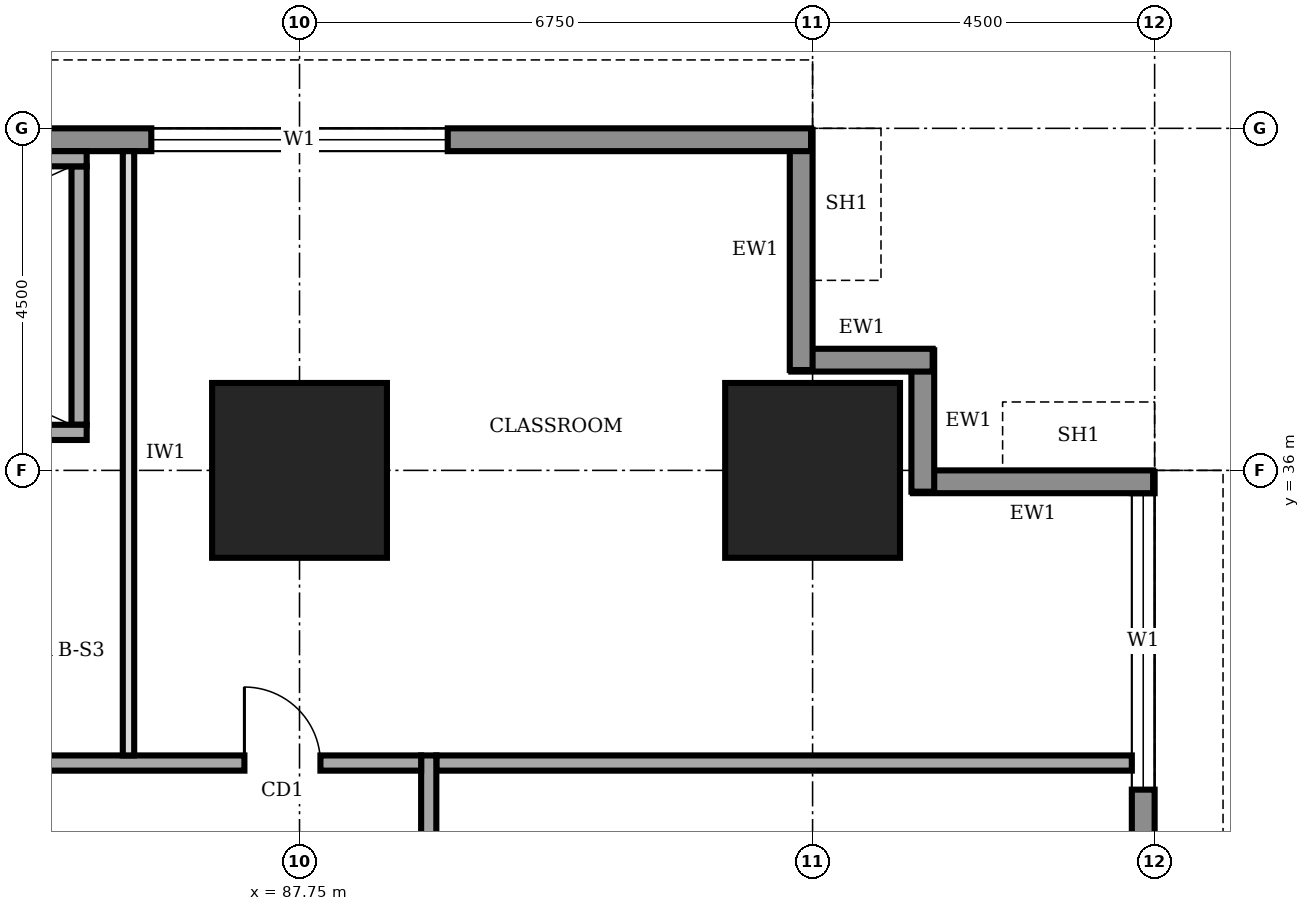
"""IFC4 building model, lengths in metres.
Left out: names, types, materials, properties, quantities, classifications, styles, units other than length and angle.
Written with IfcOpenShell. Run it as: python <this file> out.ifc"""

import sys

from ifc_helpers import new_model, si_unit, direction, frame, frame_2d, origin, origin_2d, place, context, subcontext, project, spatial, rectangle, extrude, element, fill, save


model = new_model("IFC4")
c1 = context("Model", 3, precision=1e-05, world=origin(), true_north=direction((0.0, 1.0)))
c2 = subcontext(c1, "Body", "Model", "MODEL_VIEW")
j1 = project(units=[si_unit("LENGTHUNIT", "METRE"), si_unit("PLANEANGLEUNIT", "RADIAN")], contexts=[c1])
p1 = place(None, origin())
s1 = spatial("IfcSite", under=j1, at=p1, CompositionType="ELEMENT")
p2 = place(p1, origin())
s2 = spatial("IfcBuilding", under=s1, at=p2, CompositionType="ELEMENT")
p3 = place(p2, frame((0.0, 0.0, 37.0)))
s3 = spatial("IfcBuildingStorey", under=s2, at=p3, CompositionType="ELEMENT", Elevation=37.0)
for number, where, z_axis, x_axis in (
    (1, (87.75, 36.0, 0.0), (0.0, 0.0, 1.0), (1.0, 0.0, 0.0)),
    (2, (94.5, 36.0, 0.0), (0.0, 0.0, 1.0), (1.0, 0.0, 0.0)),
):
    element("IfcColumn", number, at=place(p3, frame(where, z_axis=z_axis, x_axis=x_axis)), inside=s3, PredefinedType="COLUMN", context=c2, shape_type="SweptSolid", body=[
        extrude(rectangle(XDim=2.3, YDim=2.3, at=origin_2d()), origin(), (0.0, 0.0, 1.0), 4.0),
    ])
p4 = place(p3, frame((98.85, 4.52, 0.0), z_axis=(0.0, 0.0, 1.0), x_axis=(0.0, 1.0, 0.0)))
e3 = element("IfcWall", 3, at=p4, inside=s3, PredefinedType="STANDARD", context=c2, shape_type="SweptSolid", body=[
    extrude(rectangle(XDim=31.46, YDim=0.3, at=frame_2d((15.73, 0.0))), origin(), (0.0, 0.0, 1.0), 3.75),
])
p5 = place(p4, frame((4.78, 0.0, 0.9)))
e4 = element("IfcOpeningElement", 4, at=p5, cuts=e3, PredefinedType="OPENING", context=c2, shape_type="SweptSolid", body=[
    extrude(rectangle(XDim=3.9, YDim=2.2, at=frame_2d((1.95, 1.1))), frame((0.0, 0.16, 0.0), z_axis=(0.0, -1.0, 0.0), x_axis=(1.0, 0.0, 0.0)), (0.0, 0.0, 1.0), 0.32),
])
p6 = place(p4, frame((9.28, 0.0, 0.9)))
e5 = element("IfcOpeningElement", 5, at=p6, cuts=e3, PredefinedType="OPENING", context=c2, shape_type="SweptSolid", body=[
    extrude(rectangle(XDim=3.9, YDim=2.2, at=frame_2d((1.95, 1.1))), frame((0.0, 0.16, 0.0), z_axis=(0.0, -1.0, 0.0), x_axis=(1.0, 0.0, 0.0)), (0.0, 0.0, 1.0), 0.32),
])
p7 = place(p4, frame((13.78, 0.0, 0.9)))
e6 = element("IfcOpeningElement", 6, at=p7, cuts=e3, PredefinedType="OPENING", context=c2, shape_type="SweptSolid", body=[
    extrude(rectangle(XDim=3.9, YDim=2.2, at=frame_2d((1.95, 1.1))), frame((0.0, 0.16, 0.0), z_axis=(0.0, -1.0, 0.0), x_axis=(1.0, 0.0, 0.0)), (0.0, 0.0, 1.0), 0.32),
])
p8 = place(p4, frame((18.28, 0.0, 0.9)))
e7 = element("IfcOpeningElement", 7, at=p8, cuts=e3, PredefinedType="OPENING", context=c2, shape_type="SweptSolid", body=[
    extrude(rectangle(XDim=3.9, YDim=2.2, at=frame_2d((1.95, 1.1))), frame((0.0, 0.16, 0.0), z_axis=(0.0, -1.0, 0.0), x_axis=(1.0, 0.0, 0.0)), (0.0, 0.0, 1.0), 0.32),
])
p9 = place(p4, frame((22.78, 0.0, 0.9)))
e8 = element("IfcOpeningElement", 8, at=p9, cuts=e3, PredefinedType="OPENING", context=c2, shape_type="SweptSolid", body=[
    extrude(rectangle(XDim=3.9, YDim=2.2, at=frame_2d((1.95, 1.1))), frame((0.0, 0.16, 0.0), z_axis=(0.0, -1.0, 0.0), x_axis=(1.0, 0.0, 0.0)), (0.0, 0.0, 1.0), 0.32),
])
p10 = place(p4, frame((27.28, 0.0, 0.9)))
e9 = element("IfcOpeningElement", 9, at=p10, cuts=e3, PredefinedType="OPENING", context=c2, shape_type="SweptSolid", body=[
    extrude(rectangle(XDim=3.9, YDim=2.2, at=frame_2d((1.95, 1.1))), frame((0.0, 0.16, 0.0), z_axis=(0.0, -1.0, 0.0), x_axis=(1.0, 0.0, 0.0)), (0.0, 0.0, 1.0), 0.32),
])
p11 = place(p3, frame((98.98, 35.85, 0.0), z_axis=(0.0, 0.0, 1.0), x_axis=(-1.0, 0.0, 0.0)))
e10 = element("IfcWall", 10, at=p11, inside=s3, PredefinedType="STANDARD", context=c2, shape_type="SweptSolid", body=[
    extrude(rectangle(XDim=3.16, YDim=0.3, at=frame_2d((1.58, 0.0))), origin(), (0.0, 0.0, 1.0), 2.85),
])
for number, where, z_axis, x_axis in (
    (11, (95.95, 35.72, 0.0), (0.0, 0.0, 1.0), (0.0, 1.0, 0.0)),
    (12, (96.08, 37.45, 0.0), (0.0, 0.0, 1.0), (-1.0, 0.0, 0.0)),
):
    element("IfcWall", number, at=place(p3, frame(where, z_axis=z_axis, x_axis=x_axis)), inside=s3, PredefinedType="STANDARD", context=c2, shape_type="SweptSolid", body=[
        extrude(rectangle(XDim=1.86, YDim=0.3, at=frame_2d((0.93, 0.0))), origin(), (0.0, 0.0, 1.0), 3.75),
    ])
p12 = place(p3, frame((94.35, 37.32, 0.0), z_axis=(0.0, 0.0, 1.0), x_axis=(0.0, 1.0, 0.0)))
e13 = element("IfcWall", 13, at=p12, inside=s3, PredefinedType="STANDARD", context=c2, shape_type="SweptSolid", body=[
    extrude(rectangle(XDim=3.16, YDim=0.3, at=frame_2d((1.58, 0.0))), origin(), (0.0, 0.0, 1.0), 2.85),
])
p13 = place(p3, frame((94.48, 40.35, 0.0), z_axis=(0.0, 0.0, 1.0), x_axis=(-1.0, 0.0, 0.0)))
e14 = element("IfcWall", 14, at=p13, inside=s3, PredefinedType="STANDARD", context=c2, shape_type="SweptSolid", body=[
    extrude(rectangle(XDim=26.96, YDim=0.3, at=frame_2d((13.48, 0.0))), origin(), (0.0, 0.0, 1.0), 3.75),
])
p14 = place(p13, frame((22.78, 0.0, 0.9)))
e15 = element("IfcOpeningElement", 15, at=p14, cuts=e14, PredefinedType="OPENING", context=c2, shape_type="SweptSolid", body=[
    extrude(rectangle(XDim=3.9, YDim=2.2, at=frame_2d((1.95, 1.1))), frame((0.0, 0.16, 0.0), z_axis=(0.0, -1.0, 0.0), x_axis=(1.0, 0.0, 0.0)), (0.0, 0.0, 1.0), 0.32),
])
p15 = place(p13, frame((18.28, 0.0, 0.9)))
e16 = element("IfcOpeningElement", 16, at=p15, cuts=e14, PredefinedType="OPENING", context=c2, shape_type="SweptSolid", body=[
    extrude(rectangle(XDim=3.9, YDim=2.2, at=frame_2d((1.95, 1.1))), frame((0.0, 0.16, 0.0), z_axis=(0.0, -1.0, 0.0), x_axis=(1.0, 0.0, 0.0)), (0.0, 0.0, 1.0), 0.32),
])
p16 = place(p13, frame((4.78, 0.0, 0.9)))
e17 = element("IfcOpeningElement", 17, at=p16, cuts=e14, PredefinedType="OPENING", context=c2, shape_type="SweptSolid", body=[
    extrude(rectangle(XDim=3.9, YDim=2.2, at=frame_2d((1.95, 1.1))), frame((0.0, 0.16, 0.0), z_axis=(0.0, -1.0, 0.0), x_axis=(1.0, 0.0, 0.0)), (0.0, 0.0, 1.0), 0.32),
])
p17 = place(p3, frame((89.45, 8.45, 0.0), z_axis=(0.0, 0.0, 1.0), x_axis=(0.0, 1.0, 0.0)))
e18 = element("IfcWall", 18, at=p17, inside=s3, PredefinedType="SOLIDWALL", context=c2, shape_type="SweptSolid", body=[
    extrude(rectangle(XDim=23.8, YDim=0.2, at=frame_2d((11.9, 0.0))), origin(), (0.0, 0.0, 1.0), 3.75),
])
p18 = place(p17, frame((1.925, 0.0, 0.0)))
e19 = element("IfcOpeningElement", 19, at=p18, cuts=e18, PredefinedType="OPENING", context=c2, shape_type="SweptSolid", body=[
    extrude(rectangle(XDim=1.0, YDim=2.1, at=frame_2d((0.5, 1.05))), frame((0.0, 0.11, 0.0), z_axis=(0.0, -1.0, 0.0), x_axis=(1.0, 0.0, 0.0)), (0.0, 0.0, 1.0), 0.22),
])
p19 = place(p17, frame((5.8, 0.0, 0.0)))
e20 = element("IfcOpeningElement", 20, at=p19, cuts=e18, PredefinedType="OPENING", context=c2, shape_type="SweptSolid", body=[
    extrude(rectangle(XDim=0.9, YDim=2.1, at=frame_2d((0.45, 1.05))), frame((0.0, 0.11, 0.0), z_axis=(0.0, -1.0, 0.0), x_axis=(1.0, 0.0, 0.0)), (0.0, 0.0, 1.0), 0.22),
])
p20 = place(p17, frame((9.0, 0.0, 0.0)))
e21 = element("IfcOpeningElement", 21, at=p20, cuts=e18, PredefinedType="OPENING", context=c2, shape_type="SweptSolid", body=[
    extrude(rectangle(XDim=0.9, YDim=2.1, at=frame_2d((0.45, 1.05))), frame((0.0, 0.11, 0.0), z_axis=(0.0, -1.0, 0.0), x_axis=(1.0, 0.0, 0.0)), (0.0, 0.0, 1.0), 0.22),
])
p21 = place(p17, frame((14.55, 0.0, 0.0)))
e22 = element("IfcOpeningElement", 22, at=p21, cuts=e18, PredefinedType="OPENING", context=c2, shape_type="SweptSolid", body=[
    extrude(rectangle(XDim=0.9, YDim=2.1, at=frame_2d((0.45, 1.05))), frame((0.0, 0.11, 0.0), z_axis=(0.0, -1.0, 0.0), x_axis=(1.0, 0.0, 0.0)), (0.0, 0.0, 1.0), 0.22),
])
p22 = place(p17, frame((17.05, 0.0, 0.0)))
e23 = element("IfcOpeningElement", 23, at=p22, cuts=e18, PredefinedType="OPENING", context=c2, shape_type="SweptSolid", body=[
    extrude(rectangle(XDim=1.0, YDim=2.1, at=frame_2d((0.5, 1.05))), frame((0.0, 0.11, 0.0), z_axis=(0.0, -1.0, 0.0), x_axis=(1.0, 0.0, 0.0)), (0.0, 0.0, 1.0), 0.22),
])
p23 = place(p17, frame((11.95, 0.0, 0.0)))
e24 = element("IfcOpeningElement", 24, at=p23, cuts=e18, PredefinedType="OPENING", context=c2, shape_type="SweptSolid", body=[
    extrude(rectangle(XDim=1.0, YDim=2.1, at=frame_2d((0.5, 1.05))), frame((0.0, 0.11, 0.0), z_axis=(0.0, -1.0, 0.0), x_axis=(1.0, 0.0, 0.0)), (0.0, 0.0, 1.0), 0.22),
])
p24 = place(p17, frame((20.675, 0.0, 0.0)))
e25 = element("IfcOpeningElement", 25, at=p24, cuts=e18, PredefinedType="OPENING", context=c2, shape_type="SweptSolid", body=[
    extrude(rectangle(XDim=1.0, YDim=2.1, at=frame_2d((0.5, 1.05))), frame((0.0, 0.11, 0.0), z_axis=(0.0, -1.0, 0.0), x_axis=(1.0, 0.0, 0.0)), (0.0, 0.0, 1.0), 0.22),
])
p25 = place(p3, frame((89.35, 32.15, 0.0), z_axis=(0.0, 0.0, 1.0), x_axis=(-1.0, 0.0, 0.0)))
e26 = element("IfcWall", 26, at=p25, inside=s3, PredefinedType="SOLIDWALL", context=c2, shape_type="SweptSolid", body=[
    extrude(rectangle(XDim=16.9, YDim=0.2, at=frame_2d((8.45, 0.0))), origin(), (0.0, 0.0, 1.0), 3.75),
])
p26 = place(p25, frame((14.375, 0.0, 0.0)))
e27 = element("IfcOpeningElement", 27, at=p26, cuts=e26, PredefinedType="OPENING", context=c2, shape_type="SweptSolid", body=[
    extrude(rectangle(XDim=1.0, YDim=2.1, at=frame_2d((0.5, 1.05))), frame((0.0, 0.11, 0.0), z_axis=(0.0, -1.0, 0.0), x_axis=(1.0, 0.0, 0.0)), (0.0, 0.0, 1.0), 0.22),
])
p27 = place(p25, frame((7.85, 0.0, 0.0)))
e28 = element("IfcOpeningElement", 28, at=p27, cuts=e26, PredefinedType="OPENING", context=c2, shape_type="SweptSolid", body=[
    extrude(rectangle(XDim=1.0, YDim=2.1, at=frame_2d((0.5, 1.05))), frame((0.0, 0.11, 0.0), z_axis=(0.0, -1.0, 0.0), x_axis=(1.0, 0.0, 0.0)), (0.0, 0.0, 1.0), 0.22),
])
p28 = place(p25, frame((1.325, 0.0, 0.0)))
e29 = element("IfcOpeningElement", 29, at=p28, cuts=e26, PredefinedType="OPENING", context=c2, shape_type="SweptSolid", body=[
    extrude(rectangle(XDim=1.0, YDim=2.1, at=frame_2d((0.5, 1.05))), frame((0.0, 0.11, 0.0), z_axis=(0.0, -1.0, 0.0), x_axis=(1.0, 0.0, 0.0)), (0.0, 0.0, 1.0), 0.22),
])
p29 = place(p3, frame((89.55, 32.15, 0.0), z_axis=(0.0, 0.0, 1.0), x_axis=(1.0, 0.0, 0.0)))
e30 = element("IfcWall", 30, at=p29, inside=s3, PredefinedType="SOLIDWALL", context=c2, shape_type="SweptSolid", body=[
    extrude(rectangle(XDim=9.15, YDim=0.2, at=frame_2d((4.575, 0.0))), origin(), (0.0, 0.0, 1.0), 3.75),
])
p30 = place(p3, frame((85.5, 32.25, 0.0), z_axis=(0.0, 0.0, 1.0), x_axis=(0.0, 1.0, 0.0)))
e31 = element("IfcWall", 31, at=p30, inside=s3, PredefinedType="PARTITIONING", context=c2, shape_type="SweptSolid", body=[
    extrude(rectangle(XDim=7.95, YDim=0.15, at=frame_2d((3.975, 0.0))), origin(), (0.0, 0.0, 1.0), 3.75),
])
p31 = place(p3, frame((77.05, 36.5, 0.0), z_axis=(0.0, 0.0, 1.0), x_axis=(1.0, 0.0, 0.0)))
e32 = element("IfcWall", 32, at=p31, inside=s3, PredefinedType="SOLIDWALL", context=c2, shape_type="SweptSolid", body=[
    extrude(rectangle(XDim=7.9, YDim=0.2, at=frame_2d((3.95, 0.0))), origin(), (0.0, 0.0, 1.0), 3.75),
])
p32 = place(p31, frame((6.3, 0.0, 0.0)))
e33 = element("IfcOpeningElement", 33, at=p32, cuts=e32, PredefinedType="OPENING", context=c2, shape_type="SweptSolid", body=[
    extrude(rectangle(XDim=1.0, YDim=2.1, at=frame_2d((0.5, 1.05))), frame((0.0, 0.11, 0.0), z_axis=(0.0, -1.0, 0.0), x_axis=(1.0, 0.0, 0.0)), (0.0, 0.0, 1.0), 0.22),
])
p33 = place(p3, frame((77.05, 40.1, 0.0), z_axis=(0.0, 0.0, 1.0), x_axis=(1.0, 0.0, 0.0)))
e34 = element("IfcWall", 34, at=p33, inside=s3, PredefinedType="SOLIDWALL", context=c2, shape_type="SweptSolid", body=[
    extrude(rectangle(XDim=7.9, YDim=0.2, at=frame_2d((3.95, 0.0))), origin(), (0.0, 0.0, 1.0), 3.75),
])
p34 = place(p3, frame((84.85, 36.6, 0.0), z_axis=(0.0, 0.0, 1.0), x_axis=(0.0, 1.0, 0.0)))
e35 = element("IfcWall", 35, at=p34, inside=s3, PredefinedType="SOLIDWALL", context=c2, shape_type="SweptSolid", body=[
    extrude(rectangle(XDim=3.4, YDim=0.2, at=frame_2d((1.7, 0.0))), origin(), (0.0, 0.0, 1.0), 3.75),
])
p35 = place(p10, origin())
e36 = element("IfcWindow", 36, at=p35, inside=s3, PartitioningType="SINGLE_PANEL", PredefinedType="WINDOW", context=c2, shape_type="SweptSolid", body=[
    extrude(rectangle(XDim=3.9, YDim=2.2, at=frame_2d((1.95, 1.1))), frame((0.0, 0.03, 0.0), z_axis=(0.0, -1.0, 0.0), x_axis=(1.0, 0.0, 0.0)), (0.0, 0.0, 1.0), 0.06),
])
fill(e9, e36)
p36 = place(p16, origin())
e37 = element("IfcWindow", 37, at=p36, inside=s3, PartitioningType="SINGLE_PANEL", PredefinedType="WINDOW", context=c2, shape_type="SweptSolid", body=[
    extrude(rectangle(XDim=3.9, YDim=2.2, at=frame_2d((1.95, 1.1))), frame((0.0, 0.03, 0.0), z_axis=(0.0, -1.0, 0.0), x_axis=(1.0, 0.0, 0.0)), (0.0, 0.0, 1.0), 0.06),
])
fill(e17, e37)
p37 = place(p28, frame((1.0, 0.0, 0.0), z_axis=(0.0, 0.0, 1.0), x_axis=(-1.0, 0.0, 0.0)))
e38 = element("IfcDoor", 38, at=p37, inside=s3, OperationType="SINGLE_SWING_LEFT", PredefinedType="DOOR", context=c2, shape_type="SweptSolid", body=[
    extrude(rectangle(XDim=1.0, YDim=2.1, at=frame_2d((0.5, 1.05))), frame((0.0, 0.025, 0.0), z_axis=(0.0, -1.0, 0.0), x_axis=(1.0, 0.0, 0.0)), (0.0, 0.0, 1.0), 0.05),
])
fill(e29, e38)
save(model, sys.argv[1])
